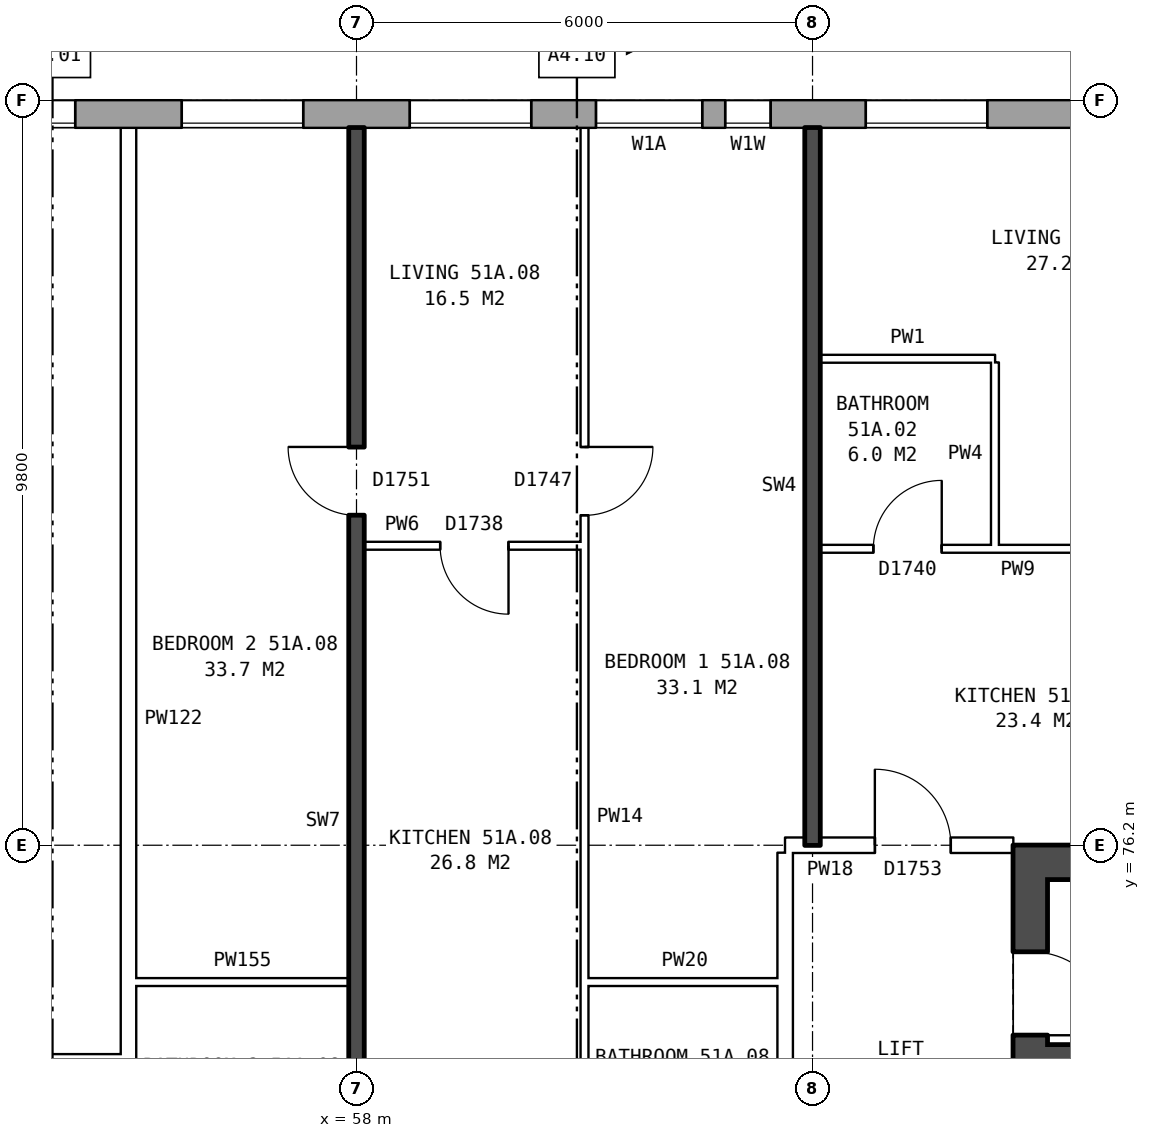
"""IFC4 building model, lengths in metres.
Left out: names, types, materials, properties, quantities, classifications, styles, units other than length and angle.
Written with IfcOpenShell. Run it as: python <this file> out.ifc"""

import sys

from ifc_helpers import new_model, si_unit, direction, frame, frame_2d, origin, place, context, subcontext, project, spatial, rectangle, extrude, element, fill, save


model = new_model("IFC4")
c1 = context("Model", 3, precision=1e-05, world=origin(), true_north=direction((0.0, 1.0)))
c2 = subcontext(c1, "Body", "Model", "MODEL_VIEW")
j1 = project(units=[si_unit("LENGTHUNIT", "METRE"), si_unit("PLANEANGLEUNIT", "RADIAN")], contexts=[c1])
p1 = place(None, origin())
s1 = spatial("IfcSite", under=j1, at=p1, CompositionType="ELEMENT")
p2 = place(p1, origin())
s2 = spatial("IfcBuilding", under=s1, at=p2, CompositionType="ELEMENT")
p3 = place(p2, frame((0.0, 0.0, 182.0)))
s3 = spatial("IfcBuildingStorey", under=s2, at=p3, CompositionType="ELEMENT", Elevation=182.0)
p4 = place(p3, frame((72.925, 85.82, 0.0), z_axis=(0.0, 0.0, 1.0), x_axis=(-1.0, 0.0, 0.0)))
e1 = element("IfcWall", 1, at=p4, inside=s3, PredefinedType="STANDARD", context=c2, shape_type="SweptSolid", body=[
    extrude(rectangle(XDim=39.601, YDim=0.36, at=frame_2d((19.8, 0.0))), origin(), (0.0, 0.0, 1.0), 2.85),
])
p5 = place(p4, frame((0.625, 0.0, 0.8)))
e2 = element("IfcOpeningElement", 2, at=p5, cuts=e1, PredefinedType="OPENING", context=c2, shape_type="SweptSolid", body=[
    extrude(rectangle(XDim=1.6, YDim=1.8, at=frame_2d((0.8, 0.9))), frame((0.0, 0.19, 0.0), z_axis=(0.0, -1.0, 0.0), x_axis=(1.0, 0.0, 0.0)), (0.0, 0.0, 1.0), 0.38),
])
p6 = place(p4, frame((3.625, 0.0, 0.8)))
e3 = element("IfcOpeningElement", 3, at=p6, cuts=e1, PredefinedType="OPENING", context=c2, shape_type="SweptSolid", body=[
    extrude(rectangle(XDim=1.6, YDim=1.8, at=frame_2d((0.8, 0.9))), frame((0.0, 0.19, 0.0), z_axis=(0.0, -1.0, 0.0), x_axis=(1.0, 0.0, 0.0)), (0.0, 0.0, 1.0), 0.38),
])
p7 = place(p4, frame((6.625, 0.0, 0.8)))
e4 = element("IfcOpeningElement", 4, at=p7, cuts=e1, PredefinedType="OPENING", context=c2, shape_type="SweptSolid", body=[
    extrude(rectangle(XDim=1.6, YDim=1.8, at=frame_2d((0.8, 0.9))), frame((0.0, 0.19, 0.0), z_axis=(0.0, -1.0, 0.0), x_axis=(1.0, 0.0, 0.0)), (0.0, 0.0, 1.0), 0.38),
])
p8 = place(p4, frame((9.475, 0.0, 0.35)))
e5 = element("IfcOpeningElement", 5, at=p8, cuts=e1, PredefinedType="OPENING", context=c2, shape_type="SweptSolid", body=[
    extrude(rectangle(XDim=0.6, YDim=0.9, at=frame_2d((0.3, 0.45))), frame((0.0, 0.19, 0.0), z_axis=(0.0, -1.0, 0.0), x_axis=(1.0, 0.0, 0.0)), (0.0, 0.0, 1.0), 0.38),
])
p9 = place(p4, frame((12.625, 0.0, 0.8)))
e6 = element("IfcOpeningElement", 6, at=p9, cuts=e1, PredefinedType="OPENING", context=c2, shape_type="SweptSolid", body=[
    extrude(rectangle(XDim=1.6, YDim=1.8, at=frame_2d((0.8, 0.9))), frame((0.0, 0.19, 0.0), z_axis=(0.0, -1.0, 0.0), x_axis=(1.0, 0.0, 0.0)), (0.0, 0.0, 1.0), 0.38),
])
p10 = place(p4, frame((15.625, 0.0, 0.8)))
e7 = element("IfcOpeningElement", 7, at=p10, cuts=e1, PredefinedType="OPENING", context=c2, shape_type="SweptSolid", body=[
    extrude(rectangle(XDim=1.6, YDim=1.8, at=frame_2d((0.8, 0.9))), frame((0.0, 0.19, 0.0), z_axis=(0.0, -1.0, 0.0), x_axis=(1.0, 0.0, 0.0)), (0.0, 0.0, 1.0), 0.38),
])
p11 = place(p4, frame((18.625, 0.0, 0.8)))
e8 = element("IfcOpeningElement", 8, at=p11, cuts=e1, PredefinedType="OPENING", context=c2, shape_type="SweptSolid", body=[
    extrude(rectangle(XDim=1.6, YDim=1.8, at=frame_2d((0.8, 0.9))), frame((0.0, 0.19, 0.0), z_axis=(0.0, -1.0, 0.0), x_axis=(1.0, 0.0, 0.0)), (0.0, 0.0, 1.0), 0.38),
])
p12 = place(p4, frame((21.625, 0.0, 0.8)))
e9 = element("IfcOpeningElement", 9, at=p12, cuts=e1, PredefinedType="OPENING", context=c2, shape_type="SweptSolid", body=[
    extrude(rectangle(XDim=1.6, YDim=1.8, at=frame_2d((0.8, 0.9))), frame((0.0, 0.19, 0.0), z_axis=(0.0, -1.0, 0.0), x_axis=(1.0, 0.0, 0.0)), (0.0, 0.0, 1.0), 0.38),
])
p13 = place(p4, frame((24.625, 0.0, 0.8)))
e10 = element("IfcOpeningElement", 10, at=p13, cuts=e1, PredefinedType="OPENING", context=c2, shape_type="SweptSolid", body=[
    extrude(rectangle(XDim=1.6, YDim=1.8, at=frame_2d((0.8, 0.9))), frame((0.0, 0.19, 0.0), z_axis=(0.0, -1.0, 0.0), x_axis=(1.0, 0.0, 0.0)), (0.0, 0.0, 1.0), 0.38),
])
p14 = place(p4, frame((27.125, 0.0, 0.8)))
e11 = element("IfcOpeningElement", 11, at=p14, cuts=e1, PredefinedType="OPENING", context=c2, shape_type="SweptSolid", body=[
    extrude(rectangle(XDim=1.6, YDim=1.8, at=frame_2d((0.8, 0.9))), frame((0.0, 0.19, 0.0), z_axis=(0.0, -1.0, 0.0), x_axis=(1.0, 0.0, 0.0)), (0.0, 0.0, 1.0), 0.38),
])
p15 = place(p4, frame((29.025, 0.0, 0.8)))
e12 = element("IfcOpeningElement", 12, at=p15, cuts=e1, PredefinedType="OPENING", context=c2, shape_type="SweptSolid", body=[
    extrude(rectangle(XDim=0.6, YDim=0.9, at=frame_2d((0.3, 0.45))), frame((0.0, 0.19, 0.0), z_axis=(0.0, -1.0, 0.0), x_axis=(1.0, 0.0, 0.0)), (0.0, 0.0, 1.0), 0.38),
])
p16 = place(p4, frame((33.625, 0.0, 0.8)))
e13 = element("IfcOpeningElement", 13, at=p16, cuts=e1, PredefinedType="OPENING", context=c2, shape_type="SweptSolid", body=[
    extrude(rectangle(XDim=1.6, YDim=1.8, at=frame_2d((0.8, 0.9))), frame((0.0, 0.19, 0.0), z_axis=(0.0, -1.0, 0.0), x_axis=(1.0, 0.0, 0.0)), (0.0, 0.0, 1.0), 0.38),
])
p17 = place(p4, frame((36.625, 0.0, 0.8)))
e14 = element("IfcOpeningElement", 14, at=p17, cuts=e1, PredefinedType="OPENING", context=c2, shape_type="SweptSolid", body=[
    extrude(rectangle(XDim=1.6, YDim=1.8, at=frame_2d((0.8, 0.9))), frame((0.0, 0.19, 0.0), z_axis=(0.0, -1.0, 0.0), x_axis=(1.0, 0.0, 0.0)), (0.0, 0.0, 1.0), 0.38),
])
p18 = place(p4, frame((10.375, 0.0, 0.35)))
e15 = element("IfcOpeningElement", 15, at=p18, cuts=e1, PredefinedType="OPENING", context=c2, shape_type="SweptSolid", body=[
    extrude(rectangle(XDim=1.4, YDim=1.8, at=frame_2d((0.7, 0.9))), frame((0.0, 0.19, 0.0), z_axis=(0.0, -1.0, 0.0), x_axis=(1.0, 0.0, 0.0)), (0.0, 0.0, 1.0), 0.38),
])
p19 = place(p4, frame((30.775, 0.0, 1.7)))
e16 = element("IfcOpeningElement", 16, at=p19, cuts=e1, PredefinedType="OPENING", context=c2, shape_type="SweptSolid", body=[
    extrude(rectangle(XDim=0.6, YDim=0.9, at=frame_2d((0.3, 0.45))), frame((0.0, 0.19, 0.0), z_axis=(0.0, -1.0, 0.0), x_axis=(1.0, 0.0, 0.0)), (0.0, 0.0, 1.0), 0.38),
])
p20 = place(p4, frame((31.675, 0.0, 0.8)))
e17 = element("IfcOpeningElement", 17, at=p20, cuts=e1, PredefinedType="OPENING", context=c2, shape_type="SweptSolid", body=[
    extrude(rectangle(XDim=1.0, YDim=1.8, at=frame_2d((0.5, 0.9))), frame((0.0, 0.19, 0.0), z_axis=(0.0, -1.0, 0.0), x_axis=(1.0, 0.0, 0.0)), (0.0, 0.0, 1.0), 0.38),
])
p21 = place(p3, frame((66.865, 63.8, 0.0), z_axis=(0.0, 0.0, 1.0), x_axis=(0.0, 1.0, 0.0)))
e18 = element("IfcWall", 18, at=p21, inside=s3, PredefinedType="SHEAR", context=c2, shape_type="SweptSolid", body=[
    extrude(rectangle(XDim=12.4, YDim=0.45, at=frame_2d((6.2, 0.0))), origin(), (0.0, 0.0, 1.0), 2.85),
])
p22 = place(p21, frame((1.325, 0.0, 0.0)))
e19 = element("IfcOpeningElement", 19, at=p22, cuts=e18, PredefinedType="OPENING", context=c2, shape_type="SweptSolid", body=[
    extrude(rectangle(XDim=1.1, YDim=2.1, at=frame_2d((0.55, 1.05))), frame((0.0, 0.235, 0.0), z_axis=(0.0, -1.0, 0.0), x_axis=(1.0, 0.0, 0.0)), (0.0, 0.0, 1.0), 0.47),
])
p23 = place(p21, frame((3.6, 0.0, 0.0)))
e20 = element("IfcOpeningElement", 20, at=p23, cuts=e18, PredefinedType="OPENING", context=c2, shape_type="SweptSolid", body=[
    extrude(rectangle(XDim=1.1, YDim=2.1, at=frame_2d((0.55, 1.05))), frame((0.0, 0.235, 0.0), z_axis=(0.0, -1.0, 0.0), x_axis=(1.0, 0.0, 0.0)), (0.0, 0.0, 1.0), 0.47),
])
p24 = place(p21, frame((5.8, 0.0, 0.0)))
e21 = element("IfcOpeningElement", 21, at=p24, cuts=e18, PredefinedType="OPENING", context=c2, shape_type="SweptSolid", body=[
    extrude(rectangle(XDim=1.1, YDim=2.1, at=frame_2d((0.55, 1.05))), frame((0.0, 0.235, 0.0), z_axis=(0.0, -1.0, 0.0), x_axis=(1.0, 0.0, 0.0)), (0.0, 0.0, 1.0), 0.47),
])
p25 = place(p21, frame((8.0, 0.0, 0.0)))
e22 = element("IfcOpeningElement", 22, at=p25, cuts=e18, PredefinedType="OPENING", context=c2, shape_type="SweptSolid", body=[
    extrude(rectangle(XDim=1.1, YDim=2.1, at=frame_2d((0.55, 1.05))), frame((0.0, 0.235, 0.0), z_axis=(0.0, -1.0, 0.0), x_axis=(1.0, 0.0, 0.0)), (0.0, 0.0, 1.0), 0.47),
])
p26 = place(p21, frame((9.9, 0.0, 0.0)))
e23 = element("IfcOpeningElement", 23, at=p26, cuts=e18, PredefinedType="OPENING", context=c2, shape_type="SweptSolid", body=[
    extrude(rectangle(XDim=1.1, YDim=2.1, at=frame_2d((0.55, 1.05))), frame((0.0, 0.235, 0.0), z_axis=(0.0, -1.0, 0.0), x_axis=(1.0, 0.0, 0.0)), (0.0, 0.0, 1.0), 0.47),
])
p27 = place(p3, frame((67.09, 75.975, 0.0), z_axis=(0.0, 0.0, 1.0), x_axis=(1.0, 0.0, 0.0)))
e24 = element("IfcWall", 24, at=p27, inside=s3, PredefinedType="SHEAR", context=c2, shape_type="SweptSolid", body=[
    extrude(rectangle(XDim=8.1, YDim=0.45, at=frame_2d((4.05, 0.0))), origin(), (0.0, 0.0, 1.0), 2.85),
])
p28 = place(p3, frame((67.09, 73.45, 0.0), z_axis=(0.0, 0.0, 1.0), x_axis=(1.0, 0.0, 0.0)))
e25 = element("IfcWall", 25, at=p28, inside=s3, PredefinedType="SHEAR", context=c2, shape_type="SweptSolid", body=[
    extrude(rectangle(XDim=2.475, YDim=0.25, at=frame_2d((1.237, 0.0))), origin(), (0.0, 0.0, 1.0), 2.85),
])
p29 = place(p3, frame((63.64, 63.9, 0.0), z_axis=(0.0, 0.0, 1.0), x_axis=(0.0, 1.0, 0.0)))
e26 = element("IfcWall", 26, at=p29, inside=s3, PredefinedType="PARTITIONING", context=c2, shape_type="SweptSolid", body=[
    extrude(rectangle(XDim=12.2, YDim=0.2, at=frame_2d((6.1, 0.0))), origin(), (0.0, 0.0, 1.0), 2.85),
])
p30 = place(p29, frame((5.1, 0.0, 0.0)))
e27 = element("IfcOpeningElement", 27, at=p30, cuts=e26, PredefinedType="OPENING", context=c2, shape_type="SweptSolid", body=[
    extrude(rectangle(XDim=2.0, YDim=2.1, at=frame_2d((1.0, 1.05))), frame((0.0, 0.11, 0.0), z_axis=(0.0, -1.0, 0.0), x_axis=(1.0, 0.0, 0.0)), (0.0, 0.0, 1.0), 0.22),
])
for number, where, z_axis, x_axis in (
    (28, (52.1, 73.4, 0.0), (0.0, 0.0, 1.0), (1.0, 0.0, 0.0)),
    (29, (55.1, 74.4, 0.0), (0.0, 0.0, 1.0), (1.0, 0.0, 0.0)),
):
    element("IfcWall", number, at=place(p3, frame(where, z_axis=z_axis, x_axis=x_axis)), inside=s3, PredefinedType="PARTITIONING", context=c2, shape_type="SweptSolid", body=[
        extrude(rectangle(XDim=2.8, YDim=0.1, at=frame_2d((1.4, 0.0))), origin(), (0.0, 0.0, 1.0), 2.85),
    ])
p31 = place(p3, frame((61.0, 74.4, 0.0), z_axis=(0.0, 0.0, 1.0), x_axis=(1.0, 0.0, 0.0)))
e30 = element("IfcWall", 30, at=p31, inside=s3, PredefinedType="PARTITIONING", context=c2, shape_type="SweptSolid", body=[
    extrude(rectangle(XDim=2.64, YDim=0.1, at=frame_2d((1.32, 0.0))), origin(), (0.0, 0.0, 1.0), 2.85),
])
p32 = place(p3, frame((63.64, 76.2, 0.0), z_axis=(0.0, 0.0, 1.0), x_axis=(1.0, 0.0, 0.0)))
e31 = element("IfcWall", 31, at=p32, inside=s3, PredefinedType="PARTITIONING", context=c2, shape_type="SweptSolid", body=[
    extrude(rectangle(XDim=3.0, YDim=0.2, at=frame_2d((1.5, 0.0))), origin(), (0.0, 0.0, 1.0), 2.85),
])
p33 = place(p32, frame((1.18, 0.0, 0.0)))
e32 = element("IfcOpeningElement", 32, at=p33, cuts=e31, PredefinedType="OPENING", context=c2, shape_type="SweptSolid", body=[
    extrude(rectangle(XDim=1.0, YDim=2.1, at=frame_2d((0.5, 1.05))), frame((0.0, 0.11, 0.0), z_axis=(0.0, -1.0, 0.0), x_axis=(1.0, 0.0, 0.0)), (0.0, 0.0, 1.0), 0.22),
])
p34 = place(p3, frame((64.1, 80.1, 0.0), z_axis=(0.0, 0.0, 1.0), x_axis=(1.0, 0.0, 0.0)))
e33 = element("IfcWall", 33, at=p34, inside=s3, PredefinedType="PARTITIONING", context=c2, shape_type="SweptSolid", body=[
    extrude(rectangle(XDim=5.8, YDim=0.1, at=frame_2d((2.9, 0.0))), origin(), (0.0, 0.0, 1.0), 2.85),
])
p35 = place(p34, frame((3.6, 0.0, 0.0)))
e34 = element("IfcOpeningElement", 34, at=p35, cuts=e33, PredefinedType="OPENING", context=c2, shape_type="SweptSolid", body=[
    extrude(rectangle(XDim=0.9, YDim=2.1, at=frame_2d((0.45, 1.05))), frame((0.0, 0.06, 0.0), z_axis=(0.0, -1.0, 0.0), x_axis=(1.0, 0.0, 0.0)), (0.0, 0.0, 1.0), 0.12),
])
p36 = place(p34, frame((0.7, 0.0, 0.0)))
e35 = element("IfcOpeningElement", 35, at=p36, cuts=e33, PredefinedType="OPENING", context=c2, shape_type="SweptSolid", body=[
    extrude(rectangle(XDim=0.9, YDim=2.1, at=frame_2d((0.45, 1.05))), frame((0.0, 0.06, 0.0), z_axis=(0.0, -1.0, 0.0), x_axis=(1.0, 0.0, 0.0)), (0.0, 0.0, 1.0), 0.12),
])
p37 = place(p3, frame((58.1, 80.14, 0.0), z_axis=(0.0, 0.0, 1.0), x_axis=(1.0, 0.0, 0.0)))
e36 = element("IfcWall", 36, at=p37, inside=s3, PredefinedType="PARTITIONING", context=c2, shape_type="SweptSolid", body=[
    extrude(rectangle(XDim=2.9, YDim=0.1, at=frame_2d((1.45, 0.0))), origin(), (0.0, 0.0, 1.0), 2.85),
])
p38 = place(p37, frame((1.0, 0.0, 0.0)))
e37 = element("IfcOpeningElement", 37, at=p38, cuts=e36, PredefinedType="OPENING", context=c2, shape_type="SweptSolid", body=[
    extrude(rectangle(XDim=0.9, YDim=2.1, at=frame_2d((0.45, 1.05))), frame((0.0, 0.06, 0.0), z_axis=(0.0, -1.0, 0.0), x_axis=(1.0, 0.0, 0.0)), (0.0, 0.0, 1.0), 0.12),
])
p39 = place(p3, frame((64.1, 82.6, 0.0), z_axis=(0.0, 0.0, 1.0), x_axis=(1.0, 0.0, 0.0)))
e38 = element("IfcWall", 38, at=p39, inside=s3, PredefinedType="PARTITIONING", context=c2, shape_type="SweptSolid", body=[
    extrude(rectangle(XDim=2.3, YDim=0.1, at=frame_2d((1.15, 0.0))), origin(), (0.0, 0.0, 1.0), 2.85),
])
p40 = place(p3, frame((55.0, 71.3, 0.0), z_axis=(0.0, 0.0, 1.0), x_axis=(0.0, 1.0, 0.0)))
e39 = element("IfcWall", 39, at=p40, inside=s3, PredefinedType="PARTITIONING", context=c2, shape_type="SweptSolid", body=[
    extrude(rectangle(XDim=14.34, YDim=0.2, at=frame_2d((7.17, 0.0))), origin(), (0.0, 0.0, 1.0), 2.85),
])
p41 = place(p3, frame((58.0, 71.2, 0.0), z_axis=(0.0, 0.0, 1.0), x_axis=(0.0, 1.0, 0.0)))
e40 = element("IfcWall", 40, at=p41, inside=s3, PredefinedType="SOLIDWALL", context=c2, shape_type="SweptSolid", body=[
    extrude(rectangle(XDim=14.44, YDim=0.2, at=frame_2d((7.22, 0.0))), origin(), (0.0, 0.0, 1.0), 2.85),
])
p42 = place(p41, frame((9.34, 0.0, 0.0)))
e41 = element("IfcOpeningElement", 41, at=p42, cuts=e40, PredefinedType="OPENING", context=c2, shape_type="SweptSolid", body=[
    extrude(rectangle(XDim=0.9, YDim=2.1, at=frame_2d((0.45, 1.05))), frame((0.0, 0.11, 0.0), z_axis=(0.0, -1.0, 0.0), x_axis=(1.0, 0.0, 0.0)), (0.0, 0.0, 1.0), 0.22),
])
p43 = place(p41, frame((0.4, 0.0, 0.0)))
e42 = element("IfcOpeningElement", 42, at=p43, cuts=e40, PredefinedType="OPENING", context=c2, shape_type="SweptSolid", body=[
    extrude(rectangle(XDim=0.9, YDim=2.1, at=frame_2d((0.45, 1.05))), frame((0.0, 0.11, 0.0), z_axis=(0.0, -1.0, 0.0), x_axis=(1.0, 0.0, 0.0)), (0.0, 0.0, 1.0), 0.22),
])
p44 = place(p3, frame((61.0, 71.3, 0.0), z_axis=(0.0, 0.0, 1.0), x_axis=(0.0, 1.0, 0.0)))
e43 = element("IfcWall", 43, at=p44, inside=s3, PredefinedType="PARTITIONING", context=c2, shape_type="SweptSolid", body=[
    extrude(rectangle(XDim=14.34, YDim=0.1, at=frame_2d((7.17, 0.0))), origin(), (0.0, 0.0, 1.0), 2.85),
])
p45 = place(p44, frame((9.24, 0.0, 0.0)))
e44 = element("IfcOpeningElement", 44, at=p45, cuts=e43, PredefinedType="OPENING", context=c2, shape_type="SweptSolid", body=[
    extrude(rectangle(XDim=0.9, YDim=2.1, at=frame_2d((0.45, 1.05))), frame((0.0, 0.06, 0.0), z_axis=(0.0, -1.0, 0.0), x_axis=(1.0, 0.0, 0.0)), (0.0, 0.0, 1.0), 0.12),
])
p46 = place(p44, frame((0.4, 0.0, 0.0)))
e45 = element("IfcOpeningElement", 45, at=p46, cuts=e43, PredefinedType="OPENING", context=c2, shape_type="SweptSolid", body=[
    extrude(rectangle(XDim=0.9, YDim=2.1, at=frame_2d((0.45, 1.05))), frame((0.0, 0.06, 0.0), z_axis=(0.0, -1.0, 0.0), x_axis=(1.0, 0.0, 0.0)), (0.0, 0.0, 1.0), 0.12),
])
p47 = place(p3, frame((64.0, 76.2, 0.0), z_axis=(0.0, 0.0, 1.0), x_axis=(0.0, 1.0, 0.0)))
e46 = element("IfcWall", 46, at=p47, inside=s3, PredefinedType="SOLIDWALL", context=c2, shape_type="SweptSolid", body=[
    extrude(rectangle(XDim=9.44, YDim=0.2, at=frame_2d((4.72, 0.0))), origin(), (0.0, 0.0, 1.0), 2.85),
])
p48 = place(p3, frame((66.4, 80.15, 0.0), z_axis=(0.0, 0.0, 1.0), x_axis=(0.0, 1.0, 0.0)))
e47 = element("IfcWall", 47, at=p48, inside=s3, PredefinedType="PARTITIONING", context=c2, shape_type="SweptSolid", body=[
    extrude(rectangle(XDim=2.4, YDim=0.1, at=frame_2d((1.2, 0.0))), origin(), (0.0, 0.0, 1.0), 2.85),
])
p49 = place(p7, origin())
e48 = element("IfcWindow", 48, at=p49, inside=s3, PartitioningType="SINGLE_PANEL", PredefinedType="WINDOW", context=c2, shape_type="SweptSolid", body=[
    extrude(rectangle(XDim=1.6, YDim=1.8, at=frame_2d((0.8, 0.9))), frame((0.0, 0.15, 0.0), z_axis=(0.0, -1.0, 0.0), x_axis=(1.0, 0.0, 0.0)), (0.0, 0.0, 1.0), 0.06),
])
fill(e4, e48)
p50 = place(p8, origin())
e49 = element("IfcWindow", 49, at=p50, inside=s3, PartitioningType="SINGLE_PANEL", PredefinedType="WINDOW", context=c2, shape_type="SweptSolid", body=[
    extrude(rectangle(XDim=0.6, YDim=0.9, at=frame_2d((0.3, 0.45))), frame((0.0, 0.15, 0.0), z_axis=(0.0, -1.0, 0.0), x_axis=(1.0, 0.0, 0.0)), (0.0, 0.0, 1.0), 0.06),
])
fill(e5, e49)
p51 = place(p9, origin())
e50 = element("IfcWindow", 50, at=p51, inside=s3, PartitioningType="SINGLE_PANEL", PredefinedType="WINDOW", context=c2, shape_type="SweptSolid", body=[
    extrude(rectangle(XDim=1.6, YDim=1.8, at=frame_2d((0.8, 0.9))), frame((0.0, 0.15, 0.0), z_axis=(0.0, -1.0, 0.0), x_axis=(1.0, 0.0, 0.0)), (0.0, 0.0, 1.0), 0.06),
])
fill(e6, e50)
p52 = place(p10, origin())
e51 = element("IfcWindow", 51, at=p52, inside=s3, PartitioningType="SINGLE_PANEL", PredefinedType="WINDOW", context=c2, shape_type="SweptSolid", body=[
    extrude(rectangle(XDim=1.6, YDim=1.8, at=frame_2d((0.8, 0.9))), frame((0.0, 0.15, 0.0), z_axis=(0.0, -1.0, 0.0), x_axis=(1.0, 0.0, 0.0)), (0.0, 0.0, 1.0), 0.06),
])
fill(e7, e51)
p53 = place(p11, origin())
e52 = element("IfcWindow", 52, at=p53, inside=s3, PartitioningType="SINGLE_PANEL", PredefinedType="WINDOW", context=c2, shape_type="SweptSolid", body=[
    extrude(rectangle(XDim=1.6, YDim=1.8, at=frame_2d((0.8, 0.9))), frame((0.0, 0.15, 0.0), z_axis=(0.0, -1.0, 0.0), x_axis=(1.0, 0.0, 0.0)), (0.0, 0.0, 1.0), 0.06),
])
fill(e8, e52)
p54 = place(p26, frame((1.1, 0.0, 0.0), z_axis=(0.0, 0.0, 1.0), x_axis=(-1.0, 0.0, 0.0)))
e53 = element("IfcDoor", 53, at=p54, inside=s3, OperationType="SINGLE_SWING_RIGHT", PredefinedType="DOOR", context=c2, shape_type="SweptSolid", body=[
    extrude(rectangle(XDim=1.1, YDim=2.1, at=frame_2d((0.55, 1.05))), frame((0.0, 0.21, 0.0), z_axis=(0.0, -1.0, 0.0), x_axis=(1.0, 0.0, 0.0)), (0.0, 0.0, 1.0), 0.05),
])
fill(e23, e53)
p55 = place(p33, origin())
e54 = element("IfcDoor", 54, at=p55, inside=s3, OperationType="SINGLE_SWING_LEFT", PredefinedType="DOOR", context=c2, shape_type="SweptSolid", body=[
    extrude(rectangle(XDim=1.0, YDim=2.1, at=frame_2d((0.5, 1.05))), frame((0.0, 0.025, 0.0), z_axis=(0.0, -1.0, 0.0), x_axis=(1.0, 0.0, 0.0)), (0.0, 0.0, 1.0), 0.05),
])
fill(e32, e54)
p56 = place(p36, origin())
e55 = element("IfcDoor", 55, at=p56, inside=s3, OperationType="SINGLE_SWING_RIGHT", PredefinedType="DOOR", context=c2, shape_type="SweptSolid", body=[
    extrude(rectangle(XDim=0.9, YDim=2.1, at=frame_2d((0.45, 1.05))), frame((0.0, 0.025, 0.0), z_axis=(0.0, -1.0, 0.0), x_axis=(1.0, 0.0, 0.0)), (0.0, 0.0, 1.0), 0.05),
])
fill(e35, e55)
p57 = place(p45, frame((0.9, 0.0, 0.0), z_axis=(0.0, 0.0, 1.0), x_axis=(-1.0, 0.0, 0.0)))
e56 = element("IfcDoor", 56, at=p57, inside=s3, OperationType="SINGLE_SWING_LEFT", PredefinedType="DOOR", context=c2, shape_type="SweptSolid", body=[
    extrude(rectangle(XDim=0.9, YDim=2.1, at=frame_2d((0.45, 1.05))), frame((0.0, 0.025, 0.0), z_axis=(0.0, -1.0, 0.0), x_axis=(1.0, 0.0, 0.0)), (0.0, 0.0, 1.0), 0.05),
])
fill(e44, e56)
p58 = place(p42, origin())
e57 = element("IfcDoor", 57, at=p58, inside=s3, OperationType="SINGLE_SWING_RIGHT", PredefinedType="DOOR", context=c2, shape_type="SweptSolid", body=[
    extrude(rectangle(XDim=0.9, YDim=2.1, at=frame_2d((0.45, 1.05))), frame((0.0, 0.025, 0.0), z_axis=(0.0, -1.0, 0.0), x_axis=(1.0, 0.0, 0.0)), (0.0, 0.0, 1.0), 0.05),
])
fill(e41, e57)
p59 = place(p38, frame((0.9, 0.0, 0.0), z_axis=(0.0, 0.0, 1.0), x_axis=(-1.0, 0.0, 0.0)))
e58 = element("IfcDoor", 58, at=p59, inside=s3, OperationType="SINGLE_SWING_LEFT", PredefinedType="DOOR", context=c2, shape_type="SweptSolid", body=[
    extrude(rectangle(XDim=0.9, YDim=2.1, at=frame_2d((0.45, 1.05))), frame((0.0, 0.025, 0.0), z_axis=(0.0, -1.0, 0.0), x_axis=(1.0, 0.0, 0.0)), (0.0, 0.0, 1.0), 0.05),
])
fill(e37, e58)
p60 = place(p18, origin())
e59 = element("IfcWindow", 59, at=p60, inside=s3, PartitioningType="SINGLE_PANEL", PredefinedType="WINDOW", context=c2, shape_type="SweptSolid", body=[
    extrude(rectangle(XDim=1.4, YDim=1.8, at=frame_2d((0.7, 0.9))), frame((0.0, 0.15, 0.0), z_axis=(0.0, -1.0, 0.0), x_axis=(1.0, 0.0, 0.0)), (0.0, 0.0, 1.0), 0.06),
])
fill(e15, e59)
save(model, sys.argv[1])
